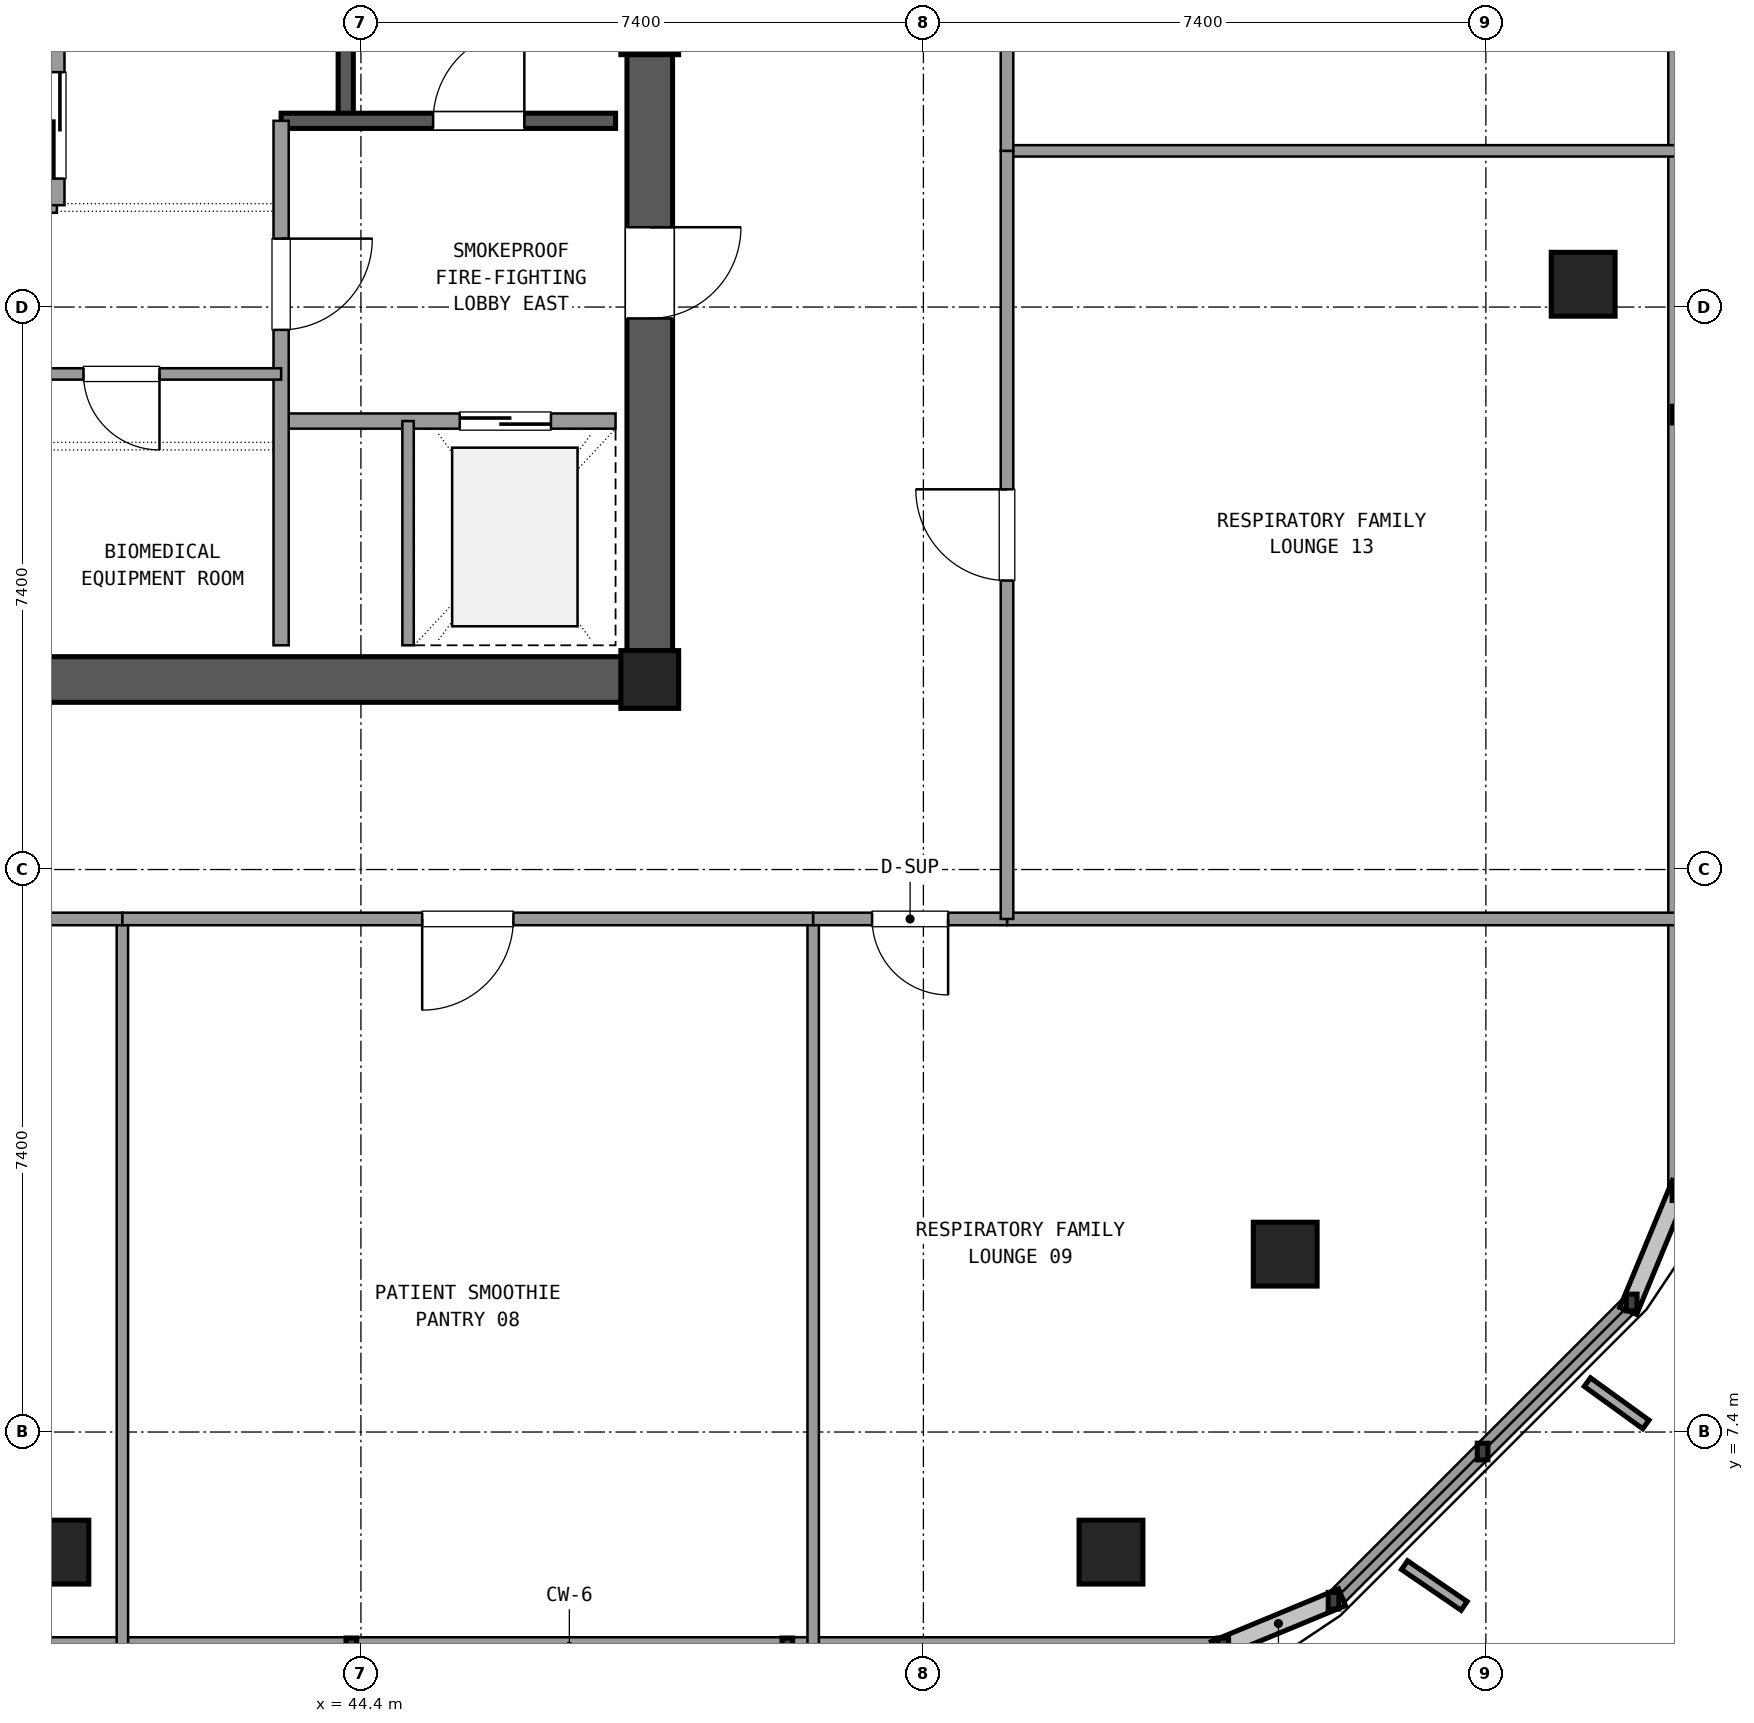
"""IFC4 building model, lengths in metres.
Left out: names, types, materials, properties, quantities, classifications, styles, units other than length and angle.
Written with IfcOpenShell. Run it as: python <this file> out.ifc"""

import sys

from ifc_helpers import new_model, si_unit, direction, frame, frame_2d, origin, origin_2d, place, context, subcontext, project, spatial, rectangle, extrude, element, fill, save


model = new_model("IFC4")
c1 = context("Model", 3, precision=1e-05, world=origin(), true_north=direction((0.0, 1.0)))
c2 = subcontext(c1, "Body", "Model", "MODEL_VIEW")
j1 = project(units=[si_unit("LENGTHUNIT", "METRE"), si_unit("PLANEANGLEUNIT", "RADIAN")], contexts=[c1])
p1 = place(None, origin())
s1 = spatial("IfcSite", under=j1, at=p1, CompositionType="ELEMENT")
p2 = place(p1, origin())
s2 = spatial("IfcBuilding", under=s1, at=p2, CompositionType="ELEMENT")
p3 = place(p2, frame((0.0, 0.0, 268.02)))
s3 = spatial("IfcBuildingStorey", under=s2, at=p3, CompositionType="ELEMENT", Elevation=268.02)
for number, where, z_axis, x_axis in (
    (1, (48.2, 17.3, 0.0), (0.0, 0.0, 1.0), (1.0, 0.0, 0.0)),
    (2, (48.2, 25.9, 0.0), (0.0, 0.0, 1.0), (1.0, 0.0, 0.0)),
):
    element("IfcColumn", number, at=place(p3, frame(where, z_axis=z_axis, x_axis=x_axis)), inside=s3, PredefinedType="COLUMN", context=c2, shape_type="SweptSolid", body=[
        extrude(rectangle(XDim=0.76, YDim=0.76, at=origin_2d()), origin(), (0.0, 0.0, 1.0), 3.6),
    ])
p4 = place(p3, frame((37.375, 17.3, 0.0), z_axis=(0.0, 0.0, 1.0), x_axis=(1.0, 0.0, 0.0)))
e3 = element("IfcWall", 3, at=p4, inside=s3, PredefinedType="SHEAR", context=c2, shape_type="SweptSolid", body=[
    extrude(rectangle(XDim=10.45, YDim=0.6, at=frame_2d((5.225, 0.0))), origin(), (0.0, 0.0, 1.0), 3.32),
])
p5 = place(p3, frame((48.2, 17.675, 0.0), z_axis=(0.0, 0.0, 1.0), x_axis=(0.0, 1.0, 0.0)))
e4 = element("IfcWall", 4, at=p5, inside=s3, PredefinedType="SHEAR", context=c2, shape_type="SweptSolid", body=[
    extrude(rectangle(XDim=7.85, YDim=0.6, at=frame_2d((3.925, 0.0))), origin(), (0.0, 0.0, 1.0), 3.32),
])
p6 = place(p5, frame((4.375, 0.0, 0.0)))
e5 = element("IfcOpeningElement", 5, at=p6, cuts=e4, PredefinedType="OPENING", context=c2, shape_type="SweptSolid", body=[
    extrude(rectangle(XDim=1.2, YDim=2.15, at=frame_2d((0.6, 1.075))), frame((0.0, 0.31, 0.0), z_axis=(0.0, -1.0, 0.0), x_axis=(1.0, 0.0, 0.0)), (0.0, 0.0, 1.0), 0.62),
])
for number, where, z_axis, x_axis in (
    (6, (40.4, 5.82, 0.0), (0.0, 0.0, 1.0), (1.0, 0.0, 0.0)),
    (7, (54.268, 5.82, 0.0), (0.0, 0.0, 1.0), (1.0, 0.0, 0.0)),
    (8, (56.56, 9.74, 0.0), (0.0, 0.0, 1.0), (1.0, 0.0, 0.0)),
    (9, (60.48, 22.5, 0.0), (0.0, 0.0, 1.0), (1.0, 0.0, 0.0)),
):
    element("IfcColumn", number, at=place(p3, frame(where, z_axis=z_axis, x_axis=x_axis)), inside=s3, PredefinedType="COLUMN", context=c2, shape_type="SweptSolid", body=[
        extrude(rectangle(XDim=0.84, YDim=0.84, at=origin_2d()), origin(), (0.0, 0.0, 1.0), 3.6),
    ])
p7 = place(p3, frame((38.539, 4.58, 0.0), z_axis=(0.0, 0.0, 1.0), x_axis=(1.0, 0.0, 0.0)))
e10 = element("IfcWall", 10, at=p7, inside=s3, PredefinedType="SOLIDWALL", context=c2, shape_type="SweptSolid", body=[
    extrude(rectangle(XDim=17.206, YDim=0.24, at=frame_2d((8.603, 0.0))), origin(), (0.0, 0.0, 1.0), 0.85),
])
p8 = place(p3, frame((57.196, 5.181, 0.0), z_axis=(0.0, 0.0, 1.0), x_axis=(0.707084777957, 0.707128783731, 0.0)))
e11 = element("IfcWall", 11, at=p8, inside=s3, PredefinedType="SOLIDWALL", context=c2, shape_type="SweptSolid", body=[
    extrude(rectangle(XDim=5.548, YDim=0.24, at=frame_2d((2.774, 0.0))), origin(), (0.0, 0.0, 1.0), 0.85),
])
p9 = place(p3, frame((61.72, 10.555, 0.0), z_axis=(0.0, 0.0, 1.0), x_axis=(0.0, 1.0, 0.0)))
e12 = element("IfcWall", 12, at=p9, inside=s3, PredefinedType="SOLIDWALL", context=c2, shape_type="SweptSolid", body=[
    extrude(rectangle(XDim=30.69, YDim=0.24, at=frame_2d((15.345, 0.0))), origin(), (0.0, 0.0, 1.0), 0.85),
])
p10 = place(p3, frame((44.2, 24.65, 0.0), z_axis=(0.0, 0.0, 1.0), x_axis=(0.0, 1.0, 0.0)))
e13 = element("IfcWall", 13, at=p10, inside=s3, PredefinedType="SHEAR", context=c2, shape_type="SweptSolid", body=[
    extrude(rectangle(XDim=9.4, YDim=0.2, at=frame_2d((4.7, 0.0))), origin(), (0.0, 0.0, 1.0), 3.32),
])
p11 = place(p3, frame((43.35, 24.65, 0.0), z_axis=(0.0, 0.0, 1.0), x_axis=(1.0, 0.0, 0.0)))
e14 = element("IfcWall", 14, at=p11, inside=s3, PredefinedType="SHEAR", context=c2, shape_type="SweptSolid", body=[
    extrude(rectangle(XDim=4.4, YDim=0.2, at=frame_2d((2.2, 0.0))), origin(), (0.0, 0.0, 1.0), 3.32),
])
p12 = place(p11, frame((2.0, 0.0, 0.0)))
e15 = element("IfcOpeningElement", 15, at=p12, cuts=e14, PredefinedType="OPENING", context=c2, shape_type="SweptSolid", body=[
    extrude(rectangle(XDim=1.2, YDim=2.15, at=frame_2d((0.6, 1.075))), frame((0.0, 0.11, 0.0), z_axis=(0.0, -1.0, 0.0), x_axis=(1.0, 0.0, 0.0)), (0.0, 0.0, 1.0), 0.22),
])
p13 = place(p3, frame((43.35, 20.7, 0.0), z_axis=(0.0, 0.0, 1.0), x_axis=(1.0, 0.0, 0.0)))
e16 = element("IfcWall", 16, at=p13, inside=s3, PredefinedType="SOLIDWALL", context=c2, shape_type="SweptSolid", body=[
    extrude(rectangle(XDim=4.4, YDim=0.2, at=frame_2d((2.2, 0.0))), origin(), (0.0, 0.0, 1.0), 2.61),
])
p14 = place(p13, frame((2.35, 0.0, 0.0)))
e17 = element("IfcOpeningElement", 17, at=p14, cuts=e16, PredefinedType="OPENING", context=c2, shape_type="SweptSolid", body=[
    extrude(rectangle(XDim=1.2, YDim=2.15, at=frame_2d((0.6, 1.075))), frame((0.0, 0.11, 0.0), z_axis=(0.0, -1.0, 0.0), x_axis=(1.0, 0.0, 0.0)), (0.0, 0.0, 1.0), 0.22),
])
p15 = place(p3, frame((43.35, 17.75, 0.0), z_axis=(0.0, 0.0, 1.0), x_axis=(0.0, 1.0, 0.0)))
e18 = element("IfcWall", 18, at=p15, inside=s3, PredefinedType="SOLIDWALL", context=c2, shape_type="SweptSolid", body=[
    extrude(rectangle(XDim=6.9, YDim=0.2, at=frame_2d((3.45, 0.0))), origin(), (0.0, 0.0, 1.0), 2.61),
])
p16 = place(p15, frame((4.15, 0.0, 0.0)))
e19 = element("IfcOpeningElement", 19, at=p16, cuts=e18, PredefinedType="OPENING", context=c2, shape_type="SweptSolid", body=[
    extrude(rectangle(XDim=1.2, YDim=2.15, at=frame_2d((0.6, 1.075))), frame((0.0, 0.11, 0.0), z_axis=(0.0, -1.0, 0.0), x_axis=(1.0, 0.0, 0.0)), (0.0, 0.0, 1.0), 0.22),
])
p17 = place(p3, frame((45.02, 17.75, 0.0), z_axis=(0.0, 0.0, 1.0), x_axis=(0.0, 1.0, 0.0)))
e20 = element("IfcWall", 20, at=p17, inside=s3, PredefinedType="PARTITIONING", context=c2, shape_type="SweptSolid", body=[
    extrude(rectangle(XDim=2.95, YDim=0.15, at=frame_2d((1.475, 0.0))), origin(), (0.0, 0.0, 1.0), 2.61),
])
p18 = place(p3, frame((37.25, 21.32, 0.0), z_axis=(0.0, 0.0, 1.0), x_axis=(1.0, 0.0, 0.0)))
e21 = element("IfcWall", 21, at=p18, inside=s3, PredefinedType="PARTITIONING", context=c2, shape_type="SweptSolid", body=[
    extrude(rectangle(XDim=6.1, YDim=0.15, at=frame_2d((3.05, 0.0))), origin(), (0.0, 0.0, 1.0), 2.61),
])
p19 = place(p18, frame((0.55, 0.0, 0.0)))
e22 = element("IfcOpeningElement", 22, at=p19, cuts=e21, PredefinedType="OPENING", context=c2, shape_type="SweptSolid", body=[
    extrude(rectangle(XDim=1.0, YDim=2.15, at=frame_2d((0.5, 1.075))), frame((0.0, 0.085, 0.0), z_axis=(0.0, -1.0, 0.0), x_axis=(1.0, 0.0, 0.0)), (0.0, 0.0, 1.0), 0.17),
])
p20 = place(p18, frame((3.5, 0.0, 0.0)))
e23 = element("IfcOpeningElement", 23, at=p20, cuts=e21, PredefinedType="OPENING", context=c2, shape_type="SweptSolid", body=[
    extrude(rectangle(XDim=1.0, YDim=2.15, at=frame_2d((0.5, 1.075))), frame((0.0, 0.085, 0.0), z_axis=(0.0, -1.0, 0.0), x_axis=(1.0, 0.0, 0.0)), (0.0, 0.0, 1.0), 0.17),
])
p21 = place(p3, frame((37.35, 23.54, 0.0), z_axis=(0.0, 0.0, 1.0), x_axis=(1.0, 0.0, 0.0)))
e24 = element("IfcWall", 24, at=p21, inside=s3, PredefinedType="SOLIDWALL", context=c2, shape_type="SweptSolid", body=[
    extrude(rectangle(XDim=3.05, YDim=0.2, at=frame_2d((1.525, 0.0))), origin(), (0.0, 0.0, 1.0), 2.61),
])
p22 = place(p3, frame((40.4, 23.54, 0.0), z_axis=(0.0, 0.0, 1.0), x_axis=(0.0, 1.0, 0.0)))
e25 = element("IfcWall", 25, at=p22, inside=s3, PredefinedType="SOLIDWALL", context=c2, shape_type="SweptSolid", body=[
    extrude(rectangle(XDim=6.82, YDim=0.2, at=frame_2d((3.41, 0.0))), origin(), (0.0, 0.0, 1.0), 2.61),
])
p23 = place(p22, frame((0.35, 0.0, 0.0)))
e26 = element("IfcOpeningElement", 26, at=p23, cuts=e25, PredefinedType="OPENING", context=c2, shape_type="SweptSolid", body=[
    extrude(rectangle(XDim=1.4, YDim=2.2, at=frame_2d((0.7, 1.1))), frame((0.0, 0.11, 0.0), z_axis=(0.0, -1.0, 0.0), x_axis=(1.0, 0.0, 0.0)), (0.0, 0.0, 1.0), 0.22),
])
p24 = place(p22, frame((2.65, 0.0, 0.0)))
e27 = element("IfcOpeningElement", 27, at=p24, cuts=e25, PredefinedType="OPENING", context=c2, shape_type="SweptSolid", body=[
    extrude(rectangle(XDim=1.4, YDim=2.2, at=frame_2d((0.7, 1.1))), frame((0.0, 0.11, 0.0), z_axis=(0.0, -1.0, 0.0), x_axis=(1.0, 0.0, 0.0)), (0.0, 0.0, 1.0), 0.22),
])
p25 = place(p22, frame((4.85, 0.0, 0.0)))
e28 = element("IfcOpeningElement", 28, at=p25, cuts=e25, PredefinedType="OPENING", context=c2, shape_type="SweptSolid", body=[
    extrude(rectangle(XDim=1.4, YDim=2.2, at=frame_2d((0.7, 1.1))), frame((0.0, 0.11, 0.0), z_axis=(0.0, -1.0, 0.0), x_axis=(1.0, 0.0, 0.0)), (0.0, 0.0, 1.0), 0.22),
])
p26 = place(p3, frame((52.9, 14.15, 0.0), z_axis=(0.0, 0.0, 1.0), x_axis=(1.0, 0.0, 0.0)))
e29 = element("IfcWall", 29, at=p26, inside=s3, PredefinedType="PARTITIONING", context=c2, shape_type="SweptSolid", body=[
    extrude(rectangle(XDim=8.8, YDim=0.165, at=frame_2d((4.4, 0.0))), origin(), (0.0, 0.0, 1.0), 2.61),
])
p27 = place(p3, frame((41.262, 14.15, 0.0), z_axis=(0.0, 0.0, 1.0), x_axis=(0.0, -1.0, 0.0)))
e30 = element("IfcWall", 30, at=p27, inside=s3, PredefinedType="PARTITIONING", context=c2, shape_type="SweptSolid", body=[
    extrude(rectangle(XDim=9.55, YDim=0.15, at=frame_2d((4.775, 0.0))), origin(), (0.0, 0.0, 1.0), 2.61),
])
p28 = place(p3, frame((32.264, 14.15, 0.0), z_axis=(0.0, 0.0, 1.0), x_axis=(1.0, 0.0, 0.0)))
e31 = element("IfcWall", 31, at=p28, inside=s3, PredefinedType="PARTITIONING", context=c2, shape_type="SweptSolid", body=[
    extrude(rectangle(XDim=8.998, YDim=0.165, at=frame_2d((4.499, 0.0))), origin(), (0.0, 0.0, 1.0), 2.61),
])
p29 = place(p28, frame((3.136, 0.0, 0.0)))
e32 = element("IfcOpeningElement", 32, at=p29, cuts=e31, PredefinedType="OPENING", context=c2, shape_type="SweptSolid", body=[
    extrude(rectangle(XDim=1.2, YDim=2.15, at=frame_2d((0.6, 1.075))), frame((0.0, 0.093, 0.0), z_axis=(0.0, -1.0, 0.0), x_axis=(1.0, 0.0, 0.0)), (0.0, 0.0, 1.0), 0.185),
])
p30 = place(p3, frame((50.35, 14.15, 0.0), z_axis=(0.0, 0.0, 1.0), x_axis=(0.0, -1.0, 0.0)))
e33 = element("IfcWall", 33, at=p30, inside=s3, PredefinedType="PARTITIONING", context=c2, shape_type="SweptSolid", body=[
    extrude(rectangle(XDim=9.55, YDim=0.15, at=frame_2d((4.775, 0.0))), origin(), (0.0, 0.0, 1.0), 2.61),
])
p31 = place(p3, frame((41.262, 14.15, 0.0), z_axis=(0.0, 0.0, 1.0), x_axis=(1.0, 0.0, 0.0)))
e34 = element("IfcWall", 34, at=p31, inside=s3, PredefinedType="PARTITIONING", context=c2, shape_type="SweptSolid", body=[
    extrude(rectangle(XDim=9.088, YDim=0.165, at=frame_2d((4.544, 0.0))), origin(), (0.0, 0.0, 1.0), 2.61),
])
p32 = place(p31, frame((3.944, 0.0, 0.0)))
e35 = element("IfcOpeningElement", 35, at=p32, cuts=e34, PredefinedType="OPENING", context=c2, shape_type="SweptSolid", body=[
    extrude(rectangle(XDim=1.2, YDim=2.15, at=frame_2d((0.6, 1.075))), frame((0.0, 0.093, 0.0), z_axis=(0.0, -1.0, 0.0), x_axis=(1.0, 0.0, 0.0)), (0.0, 0.0, 1.0), 0.185),
])
p33 = place(p3, frame((50.35, 14.15, 0.0), z_axis=(0.0, 0.0, 1.0), x_axis=(1.0, 0.0, 0.0)))
e36 = element("IfcWall", 36, at=p33, inside=s3, PredefinedType="PARTITIONING", context=c2, shape_type="SweptSolid", body=[
    extrude(rectangle(XDim=2.55, YDim=0.165, at=frame_2d((1.275, 0.0))), origin(), (0.0, 0.0, 1.0), 2.61),
])
p34 = place(p33, frame((0.775, 0.0, 0.0)))
e37 = element("IfcOpeningElement", 37, at=p34, cuts=e36, PredefinedType="OPENING", context=c2, shape_type="SweptSolid", body=[
    extrude(rectangle(XDim=1.0, YDim=2.15, at=frame_2d((0.5, 1.075))), frame((0.0, 0.093, 0.0), z_axis=(0.0, -1.0, 0.0), x_axis=(1.0, 0.0, 0.0)), (0.0, 0.0, 1.0), 0.185),
])
p35 = place(p3, frame((52.9, 24.255, 0.0), z_axis=(0.0, 0.0, 1.0), x_axis=(1.0, 0.0, 0.0)))
e38 = element("IfcWall", 38, at=p35, inside=s3, PredefinedType="PARTITIONING", context=c2, shape_type="SweptSolid", body=[
    extrude(rectangle(XDim=8.8, YDim=0.15, at=frame_2d((4.4, 0.0))), origin(), (0.0, 0.0, 1.0), 2.61),
])
p36 = place(p3, frame((52.9, 14.15, 0.0), z_axis=(0.0, 0.0, 1.0), x_axis=(0.0, 1.0, 0.0)))
e39 = element("IfcWall", 39, at=p36, inside=s3, PredefinedType="PARTITIONING", context=c2, shape_type="SweptSolid", body=[
    extrude(rectangle(XDim=10.105, YDim=0.165, at=frame_2d((5.052, 0.0))), origin(), (0.0, 0.0, 1.0), 2.61),
])
p37 = place(p36, frame((4.452, 0.0, 0.0)))
e40 = element("IfcOpeningElement", 40, at=p37, cuts=e39, PredefinedType="OPENING", context=c2, shape_type="SweptSolid", body=[
    extrude(rectangle(XDim=1.2, YDim=2.15, at=frame_2d((0.6, 1.075))), frame((0.0, 0.093, 0.0), z_axis=(0.0, -1.0, 0.0), x_axis=(1.0, 0.0, 0.0)), (0.0, 0.0, 1.0), 0.185),
])
p38 = place(p3, frame((52.9, 24.255, 0.0), z_axis=(0.0, 0.0, 1.0), x_axis=(0.0, 1.0, 0.0)))
e41 = element("IfcWall", 41, at=p38, inside=s3, PredefinedType="PARTITIONING", context=c2, shape_type="SweptSolid", body=[
    extrude(rectangle(XDim=13.395, YDim=0.165, at=frame_2d((6.698, 0.0))), origin(), (0.0, 0.0, 1.0), 2.61),
])
p39 = place(p38, frame((6.098, 0.0, 0.0)))
e42 = element("IfcOpeningElement", 42, at=p39, cuts=e41, PredefinedType="OPENING", context=c2, shape_type="SweptSolid", body=[
    extrude(rectangle(XDim=1.2, YDim=2.15, at=frame_2d((0.6, 1.075))), frame((0.0, 0.093, 0.0), z_axis=(0.0, -1.0, 0.0), x_axis=(1.0, 0.0, 0.0)), (0.0, 0.0, 1.0), 0.185),
])
p40 = place(p12, origin())
e43 = element("IfcDoor", 43, at=p40, inside=s3, OperationType="SINGLE_SWING_RIGHT", PredefinedType="DOOR", context=c2, shape_type="SweptSolid", body=[
    extrude(rectangle(XDim=1.2, YDim=2.15, at=frame_2d((0.6, 1.075))), frame((0.0, 0.025, 0.0), z_axis=(0.0, -1.0, 0.0), x_axis=(1.0, 0.0, 0.0)), (0.0, 0.0, 1.0), 0.05),
])
fill(e15, e43)
p41 = place(p14, origin())
e44 = element("IfcDoor", 44, at=p41, inside=s3, OperationType="SLIDING_TO_RIGHT", PredefinedType="DOOR", context=c2, shape_type="SweptSolid", body=[
    extrude(rectangle(XDim=1.2, YDim=2.15, at=frame_2d((0.6, 1.075))), frame((0.0, 0.025, 0.0), z_axis=(0.0, -1.0, 0.0), x_axis=(1.0, 0.0, 0.0)), (0.0, 0.0, 1.0), 0.05),
])
fill(e17, e44)
p42 = place(p16, frame((1.2, 0.0, 0.0), z_axis=(0.0, 0.0, 1.0), x_axis=(-1.0, 0.0, 0.0)))
e45 = element("IfcDoor", 45, at=p42, inside=s3, OperationType="SINGLE_SWING_RIGHT", PredefinedType="DOOR", context=c2, shape_type="SweptSolid", body=[
    extrude(rectangle(XDim=1.2, YDim=2.15, at=frame_2d((0.6, 1.075))), frame((0.0, 0.025, 0.0), z_axis=(0.0, -1.0, 0.0), x_axis=(1.0, 0.0, 0.0)), (0.0, 0.0, 1.0), 0.05),
])
fill(e19, e45)
p43 = place(p6, frame((1.2, 0.0, 0.0), z_axis=(0.0, 0.0, 1.0), x_axis=(-1.0, 0.0, 0.0)))
e46 = element("IfcDoor", 46, at=p43, inside=s3, OperationType="SINGLE_SWING_RIGHT", PredefinedType="DOOR", context=c2, shape_type="SweptSolid", body=[
    extrude(rectangle(XDim=1.2, YDim=2.15, at=frame_2d((0.6, 1.075))), frame((0.0, 0.025, 0.0), z_axis=(0.0, -1.0, 0.0), x_axis=(1.0, 0.0, 0.0)), (0.0, 0.0, 1.0), 0.05),
])
fill(e5, e46)
p44 = place(p20, frame((1.0, 0.0, 0.0), z_axis=(0.0, 0.0, 1.0), x_axis=(-1.0, 0.0, 0.0)))
e47 = element("IfcDoor", 47, at=p44, inside=s3, OperationType="SINGLE_SWING_RIGHT", PredefinedType="DOOR", context=c2, shape_type="SweptSolid", body=[
    extrude(rectangle(XDim=1.0, YDim=2.15, at=frame_2d((0.5, 1.075))), frame((0.0, 0.025, 0.0), z_axis=(0.0, -1.0, 0.0), x_axis=(1.0, 0.0, 0.0)), (0.0, 0.0, 1.0), 0.05),
])
fill(e23, e47)
p45 = place(p23, origin())
e48 = element("IfcDoor", 48, at=p45, inside=s3, OperationType="SLIDING_TO_LEFT", PredefinedType="DOOR", context=c2, shape_type="SweptSolid", body=[
    extrude(rectangle(XDim=1.4, YDim=2.2, at=frame_2d((0.7, 1.1))), frame((0.0, 0.025, 0.0), z_axis=(0.0, -1.0, 0.0), x_axis=(1.0, 0.0, 0.0)), (0.0, 0.0, 1.0), 0.05),
])
fill(e26, e48)
p46 = place(p32, frame((1.2, 0.0, 0.0), z_axis=(0.0, 0.0, 1.0), x_axis=(-1.0, 0.0, 0.0)))
e49 = element("IfcDoor", 49, at=p46, inside=s3, OperationType="SINGLE_SWING_LEFT", PredefinedType="DOOR", context=c2, shape_type="SweptSolid", body=[
    extrude(rectangle(XDim=1.2, YDim=2.15, at=frame_2d((0.6, 1.075))), frame((0.0, 0.025, 0.0), z_axis=(0.0, -1.0, 0.0), x_axis=(1.0, 0.0, 0.0)), (0.0, 0.0, 1.0), 0.05),
])
fill(e35, e49)
p47 = place(p34, frame((1.0, 0.0, 0.0), z_axis=(0.0, 0.0, 1.0), x_axis=(-1.0, 0.0, 0.0)))
e50 = element("IfcDoor", 50, at=p47, inside=s3, OperationType="SINGLE_SWING_RIGHT", PredefinedType="DOOR", context=c2, shape_type="SweptSolid", body=[
    extrude(rectangle(XDim=1.0, YDim=2.15, at=frame_2d((0.5, 1.075))), frame((0.0, 0.025, 0.0), z_axis=(0.0, -1.0, 0.0), x_axis=(1.0, 0.0, 0.0)), (0.0, 0.0, 1.0), 0.05),
])
fill(e37, e50)
p48 = place(p37, origin())
e51 = element("IfcDoor", 51, at=p48, inside=s3, OperationType="SINGLE_SWING_RIGHT", PredefinedType="DOOR", context=c2, shape_type="SweptSolid", body=[
    extrude(rectangle(XDim=1.2, YDim=2.15, at=frame_2d((0.6, 1.075))), frame((0.0, 0.025, 0.0), z_axis=(0.0, -1.0, 0.0), x_axis=(1.0, 0.0, 0.0)), (0.0, 0.0, 1.0), 0.05),
])
fill(e40, e51)
save(model, sys.argv[1])
